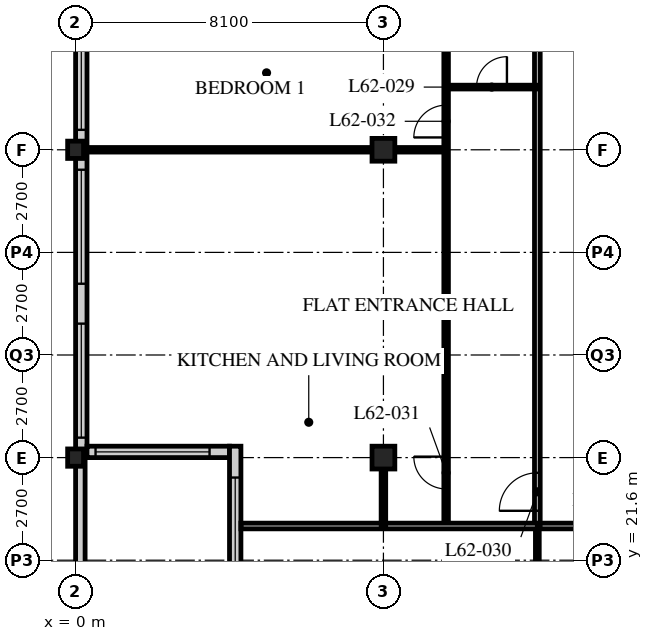
"""IFC4 building model, lengths in metres.
Left out: names, types, materials, properties, quantities, classifications, styles, units other than length and angle.
Written with IfcOpenShell. Run it as: python <this file> out.ifc"""

import sys

from ifc_helpers import new_model, si_unit, direction, frame, frame_2d, origin, origin_2d, place, context, subcontext, project, spatial, rectangle, hollow_rectangle, i_section, extrude, element, fill, save


model = new_model("IFC4")
c1 = context("Model", 3, precision=1e-05, world=origin(), true_north=direction((0.0, 1.0)))
c2 = subcontext(c1, "Body", "Model", "MODEL_VIEW")
j1 = project(units=[si_unit("LENGTHUNIT", "METRE"), si_unit("PLANEANGLEUNIT", "RADIAN")], contexts=[c1])
p1 = place(None, origin())
s1 = spatial("IfcSite", under=j1, at=p1, CompositionType="ELEMENT")
p2 = place(p1, origin())
s2 = spatial("IfcBuilding", under=s1, at=p2, CompositionType="ELEMENT")
p3 = place(p2, frame((0.0, 0.0, 242.4)))
s3 = spatial("IfcBuildingStorey", under=s2, at=p3, CompositionType="ELEMENT", Elevation=242.4)
for number, where, z_axis, x_axis in (
    (1, (0.0, 24.3, 0.0), (0.0, 0.0, 1.0), (1.0, 0.0, 0.0)),
    (2, (0.0, 32.4, 0.0), (0.0, 0.0, 1.0), (1.0, 0.0, 0.0)),
):
    element("IfcColumn", number, at=place(p3, frame(where, z_axis=z_axis, x_axis=x_axis)), inside=s3, PredefinedType="COLUMN", context=c2, shape_type="SweptSolid", body=[
        extrude(i_section(OverallWidth=0.418, OverallDepth=0.456, WebThickness=0.042, FlangeThickness=0.067, FilletRadius=0.015, at=origin_2d()), origin(), (0.0, 0.0, 1.0), 3.9),
    ])
for number, where, z_axis, x_axis in (
    (3, (8.1, 24.3, 0.0), (0.0, 0.0, 1.0), (1.0, 0.0, 0.0)),
    (4, (8.1, 32.4, 0.0), (0.0, 0.0, 1.0), (1.0, 0.0, 0.0)),
):
    element("IfcColumn", number, at=place(p3, frame(where, z_axis=z_axis, x_axis=x_axis)), inside=s3, PredefinedType="COLUMN", context=c2, shape_type="SweptSolid", body=[
        extrude(hollow_rectangle(XDim=0.6, YDim=0.6, WallThickness=0.05, at=origin_2d()), origin(), (0.0, 0.0, 1.0), 3.9),
    ])
p4 = place(p3, frame((0.15, 56.4, 0.0), z_axis=(0.0, 0.0, 1.0), x_axis=(0.0, -1.0, 0.0)))
e5 = element("IfcWall", 5, at=p4, inside=s3, PredefinedType="SOLIDWALL", context=c2, shape_type="SweptSolid", body=[
    extrude(rectangle(XDim=32.1, YDim=0.3, at=frame_2d((16.05, 0.0))), origin(), (0.0, 0.0, 1.0), 3.69),
])
p5 = place(p4, frame((0.225, 0.0, 0.6)))
e6 = element("IfcOpeningElement", 6, at=p5, cuts=e5, PredefinedType="OPENING", context=c2, shape_type="SweptSolid", body=[
    extrude(rectangle(XDim=3.0, YDim=2.3, at=frame_2d((1.5, 1.15))), frame((0.0, 0.16, 0.0), z_axis=(0.0, -1.0, 0.0), x_axis=(1.0, 0.0, 0.0)), (0.0, 0.0, 1.0), 0.32),
])
p6 = place(p4, frame((4.275, 0.0, 0.6)))
e7 = element("IfcOpeningElement", 7, at=p6, cuts=e5, PredefinedType="OPENING", context=c2, shape_type="SweptSolid", body=[
    extrude(rectangle(XDim=3.0, YDim=2.3, at=frame_2d((1.5, 1.15))), frame((0.0, 0.16, 0.0), z_axis=(0.0, -1.0, 0.0), x_axis=(1.0, 0.0, 0.0)), (0.0, 0.0, 1.0), 0.32),
])
p7 = place(p4, frame((8.325, 0.0, 0.6)))
e8 = element("IfcOpeningElement", 8, at=p7, cuts=e5, PredefinedType="OPENING", context=c2, shape_type="SweptSolid", body=[
    extrude(rectangle(XDim=3.0, YDim=2.3, at=frame_2d((1.5, 1.15))), frame((0.0, 0.16, 0.0), z_axis=(0.0, -1.0, 0.0), x_axis=(1.0, 0.0, 0.0)), (0.0, 0.0, 1.0), 0.32),
])
p8 = place(p4, frame((12.375, 0.0, 0.6)))
e9 = element("IfcOpeningElement", 9, at=p8, cuts=e5, PredefinedType="OPENING", context=c2, shape_type="SweptSolid", body=[
    extrude(rectangle(XDim=3.0, YDim=2.3, at=frame_2d((1.5, 1.15))), frame((0.0, 0.16, 0.0), z_axis=(0.0, -1.0, 0.0), x_axis=(1.0, 0.0, 0.0)), (0.0, 0.0, 1.0), 0.32),
])
p9 = place(p4, frame((16.425, 0.0, 0.6)))
e10 = element("IfcOpeningElement", 10, at=p9, cuts=e5, PredefinedType="OPENING", context=c2, shape_type="SweptSolid", body=[
    extrude(rectangle(XDim=3.0, YDim=2.3, at=frame_2d((1.5, 1.15))), frame((0.0, 0.16, 0.0), z_axis=(0.0, -1.0, 0.0), x_axis=(1.0, 0.0, 0.0)), (0.0, 0.0, 1.0), 0.32),
])
p10 = place(p4, frame((20.475, 0.0, 0.6)))
e11 = element("IfcOpeningElement", 11, at=p10, cuts=e5, PredefinedType="OPENING", context=c2, shape_type="SweptSolid", body=[
    extrude(rectangle(XDim=3.0, YDim=2.3, at=frame_2d((1.5, 1.15))), frame((0.0, 0.16, 0.0), z_axis=(0.0, -1.0, 0.0), x_axis=(1.0, 0.0, 0.0)), (0.0, 0.0, 1.0), 0.32),
])
p11 = place(p4, frame((24.525, 0.0, 0.6)))
e12 = element("IfcOpeningElement", 12, at=p11, cuts=e5, PredefinedType="OPENING", context=c2, shape_type="SweptSolid", body=[
    extrude(rectangle(XDim=3.0, YDim=2.3, at=frame_2d((1.5, 1.15))), frame((0.0, 0.16, 0.0), z_axis=(0.0, -1.0, 0.0), x_axis=(1.0, 0.0, 0.0)), (0.0, 0.0, 1.0), 0.32),
])
p12 = place(p4, frame((28.575, 0.0, 0.6)))
e13 = element("IfcOpeningElement", 13, at=p12, cuts=e5, PredefinedType="OPENING", context=c2, shape_type="SweptSolid", body=[
    extrude(rectangle(XDim=3.0, YDim=2.3, at=frame_2d((1.5, 1.15))), frame((0.0, 0.16, 0.0), z_axis=(0.0, -1.0, 0.0), x_axis=(1.0, 0.0, 0.0)), (0.0, 0.0, 1.0), 0.32),
])
p13 = place(p3, frame((0.3, 24.45, 0.0), z_axis=(0.0, 0.0, 1.0), x_axis=(1.0, 0.0, 0.0)))
e14 = element("IfcWall", 14, at=p13, inside=s3, PredefinedType="SOLIDWALL", context=c2, shape_type="SweptSolid", body=[
    extrude(rectangle(XDim=3.75, YDim=0.3, at=frame_2d((1.875, 0.0))), origin(), (0.0, 0.0, 1.0), 3.69),
])
p14 = place(p13, frame((0.225, 0.0, 0.6)))
e15 = element("IfcOpeningElement", 15, at=p14, cuts=e14, PredefinedType="OPENING", context=c2, shape_type="SweptSolid", body=[
    extrude(rectangle(XDim=3.0, YDim=2.3, at=frame_2d((1.5, 1.15))), frame((0.0, 0.16, 0.0), z_axis=(0.0, -1.0, 0.0), x_axis=(1.0, 0.0, 0.0)), (0.0, 0.0, 1.0), 0.32),
])
p15 = place(p3, frame((4.2, 24.6, 0.0), z_axis=(0.0, 0.0, 1.0), x_axis=(0.0, -1.0, 0.0)))
e16 = element("IfcWall", 16, at=p15, inside=s3, PredefinedType="SOLIDWALL", context=c2, shape_type="SweptSolid", body=[
    extrude(rectangle(XDim=4.35, YDim=0.3, at=frame_2d((2.175, 0.0))), origin(), (0.0, 0.0, 1.0), 3.69),
])
p16 = place(p15, frame((0.825, 0.0, 0.6)))
e17 = element("IfcOpeningElement", 17, at=p16, cuts=e16, PredefinedType="OPENING", context=c2, shape_type="SweptSolid", body=[
    extrude(rectangle(XDim=3.0, YDim=2.3, at=frame_2d((1.5, 1.15))), frame((0.0, 0.16, 0.0), z_axis=(0.0, -1.0, 0.0), x_axis=(1.0, 0.0, 0.0)), (0.0, 0.0, 1.0), 0.32),
])
p17 = place(p3, frame((0.125, 24.3, 0.0), z_axis=(0.0, 0.0, 1.0), x_axis=(0.0, -1.0, 0.0)))
e18 = element("IfcWall", 18, at=p17, inside=s3, PredefinedType="PARAPET", context=c2, shape_type="SweptSolid", body=[
    extrude(rectangle(XDim=5.4, YDim=0.25, at=frame_2d((2.7, 0.0))), origin(), (0.0, 0.0, 1.0), 1.38),
])
p18 = place(p3, frame((12.15, 22.5, 0.0), z_axis=(0.0, 0.0, 1.0), x_axis=(1.0, 0.0, 0.0)))
e19 = element("IfcWall", 19, at=p18, inside=s3, PredefinedType="PARTITIONING", context=c2, shape_type="SweptSolid", body=[
    extrude(rectangle(XDim=32.4, YDim=0.15, at=frame_2d((16.2, 0.0))), origin(), (0.0, 0.0, 1.0), 3.69),
])
p19 = place(p18, frame((6.4, 0.0, 0.0)))
e20 = element("IfcOpeningElement", 20, at=p19, cuts=e19, PredefinedType="OPENING", context=c2, shape_type="SweptSolid", body=[
    extrude(rectangle(XDim=1.0, YDim=2.1, at=frame_2d((0.5, 1.05))), frame((0.0, 0.085, 0.0), z_axis=(0.0, -1.0, 0.0), x_axis=(1.0, 0.0, 0.0)), (0.0, 0.0, 1.0), 0.17),
])
p20 = place(p18, frame((10.45, 0.0, 0.0)))
e21 = element("IfcOpeningElement", 21, at=p20, cuts=e19, PredefinedType="OPENING", context=c2, shape_type="SweptSolid", body=[
    extrude(rectangle(XDim=1.0, YDim=2.1, at=frame_2d((0.5, 1.05))), frame((0.0, 0.085, 0.0), z_axis=(0.0, -1.0, 0.0), x_axis=(1.0, 0.0, 0.0)), (0.0, 0.0, 1.0), 0.17),
])
p21 = place(p18, frame((14.5, 0.0, 0.0)))
e22 = element("IfcOpeningElement", 22, at=p21, cuts=e19, PredefinedType="OPENING", context=c2, shape_type="SweptSolid", body=[
    extrude(rectangle(XDim=1.0, YDim=2.1, at=frame_2d((0.5, 1.05))), frame((0.0, 0.085, 0.0), z_axis=(0.0, -1.0, 0.0), x_axis=(1.0, 0.0, 0.0)), (0.0, 0.0, 1.0), 0.17),
])
p22 = place(p18, frame((17.725, 0.0, 0.0)))
e23 = element("IfcOpeningElement", 23, at=p22, cuts=e19, PredefinedType="OPENING", context=c2, shape_type="SweptSolid", body=[
    extrude(rectangle(XDim=1.0, YDim=2.1, at=frame_2d((0.5, 1.05))), frame((0.0, 0.085, 0.0), z_axis=(0.0, -1.0, 0.0), x_axis=(1.0, 0.0, 0.0)), (0.0, 0.0, 1.0), 0.17),
])
p23 = place(p18, frame((22.6, 0.0, 0.0)))
e24 = element("IfcOpeningElement", 24, at=p23, cuts=e19, PredefinedType="OPENING", context=c2, shape_type="SweptSolid", body=[
    extrude(rectangle(XDim=1.0, YDim=2.1, at=frame_2d((0.5, 1.05))), frame((0.0, 0.085, 0.0), z_axis=(0.0, -1.0, 0.0), x_axis=(1.0, 0.0, 0.0)), (0.0, 0.0, 1.0), 0.17),
])
p24 = place(p18, frame((26.65, 0.0, 0.0)))
e25 = element("IfcOpeningElement", 25, at=p24, cuts=e19, PredefinedType="OPENING", context=c2, shape_type="SweptSolid", body=[
    extrude(rectangle(XDim=1.0, YDim=2.1, at=frame_2d((0.5, 1.05))), frame((0.0, 0.085, 0.0), z_axis=(0.0, -1.0, 0.0), x_axis=(1.0, 0.0, 0.0)), (0.0, 0.0, 1.0), 0.17),
])
p25 = place(p18, frame((2.625, 0.0, 0.0)))
e26 = element("IfcOpeningElement", 26, at=p25, cuts=e19, PredefinedType="OPENING", context=c2, shape_type="SweptSolid", body=[
    extrude(rectangle(XDim=1.0, YDim=2.1, at=frame_2d((0.5, 1.05))), frame((0.0, 0.085, 0.0), z_axis=(0.0, -1.0, 0.0), x_axis=(1.0, 0.0, 0.0)), (0.0, 0.0, 1.0), 0.17),
])
p26 = place(p18, frame((28.775, 0.0, 0.0)))
e27 = element("IfcOpeningElement", 27, at=p26, cuts=e19, PredefinedType="OPENING", context=c2, shape_type="SweptSolid", body=[
    extrude(rectangle(XDim=1.0, YDim=2.1, at=frame_2d((0.5, 1.05))), frame((0.0, 0.085, 0.0), z_axis=(0.0, -1.0, 0.0), x_axis=(1.0, 0.0, 0.0)), (0.0, 0.0, 1.0), 0.17),
])
p27 = place(p3, frame((12.15, 22.5, 0.0), z_axis=(0.0, 0.0, 1.0), x_axis=(0.0, 1.0, 0.0)))
e28 = element("IfcWall", 28, at=p27, inside=s3, PredefinedType="PARTITIONING", context=c2, shape_type="SweptSolid", body=[
    extrude(rectangle(XDim=26.1, YDim=0.15, at=frame_2d((13.05, 0.0))), origin(), (0.0, 0.0, 1.0), 3.69),
])
p28 = place(p27, frame((0.4, 0.0, 0.0)))
e29 = element("IfcOpeningElement", 29, at=p28, cuts=e28, PredefinedType="OPENING", context=c2, shape_type="SweptSolid", body=[
    extrude(rectangle(XDim=1.0, YDim=2.1, at=frame_2d((0.5, 1.05))), frame((0.0, 0.085, 0.0), z_axis=(0.0, -1.0, 0.0), x_axis=(1.0, 0.0, 0.0)), (0.0, 0.0, 1.0), 0.17),
])
p29 = place(p27, frame((14.35, 0.0, 0.0)))
e30 = element("IfcOpeningElement", 30, at=p29, cuts=e28, PredefinedType="OPENING", context=c2, shape_type="SweptSolid", body=[
    extrude(rectangle(XDim=1.0, YDim=2.1, at=frame_2d((0.5, 1.05))), frame((0.0, 0.085, 0.0), z_axis=(0.0, -1.0, 0.0), x_axis=(1.0, 0.0, 0.0)), (0.0, 0.0, 1.0), 0.17),
])
p30 = place(p3, frame((9.75, 22.5, 0.0), z_axis=(0.0, 0.0, 1.0), x_axis=(0.0, 1.0, 0.0)))
e31 = element("IfcWall", 31, at=p30, inside=s3, PredefinedType="PARTITIONING", context=c2, shape_type="SweptSolid", body=[
    extrude(rectangle(XDim=26.1, YDim=0.12, at=frame_2d((13.05, 0.0))), origin(), (0.0, 0.0, 1.0), 3.69),
])
p31 = place(p30, frame((0.975, 0.0, 0.0)))
e32 = element("IfcOpeningElement", 32, at=p31, cuts=e31, PredefinedType="OPENING", context=c2, shape_type="SweptSolid", body=[
    extrude(rectangle(XDim=0.85, YDim=2.1, at=frame_2d((0.425, 1.05))), frame((0.0, 0.07, 0.0), z_axis=(0.0, -1.0, 0.0), x_axis=(1.0, 0.0, 0.0)), (0.0, 0.0, 1.0), 0.14),
])
p32 = place(p30, frame((10.225, 0.0, 0.0)))
e33 = element("IfcOpeningElement", 33, at=p32, cuts=e31, PredefinedType="OPENING", context=c2, shape_type="SweptSolid", body=[
    extrude(rectangle(XDim=0.85, YDim=2.1, at=frame_2d((0.425, 1.05))), frame((0.0, 0.07, 0.0), z_axis=(0.0, -1.0, 0.0), x_axis=(1.0, 0.0, 0.0)), (0.0, 0.0, 1.0), 0.14),
])
p33 = place(p30, frame((14.925, 0.0, 0.0)))
e34 = element("IfcOpeningElement", 34, at=p33, cuts=e31, PredefinedType="OPENING", context=c2, shape_type="SweptSolid", body=[
    extrude(rectangle(XDim=0.85, YDim=2.1, at=frame_2d((0.425, 1.05))), frame((0.0, 0.07, 0.0), z_axis=(0.0, -1.0, 0.0), x_axis=(1.0, 0.0, 0.0)), (0.0, 0.0, 1.0), 0.14),
])
p34 = place(p30, frame((22.375, 0.0, 0.0)))
e35 = element("IfcOpeningElement", 35, at=p34, cuts=e31, PredefinedType="OPENING", context=c2, shape_type="SweptSolid", body=[
    extrude(rectangle(XDim=0.85, YDim=2.1, at=frame_2d((0.425, 1.05))), frame((0.0, 0.07, 0.0), z_axis=(0.0, -1.0, 0.0), x_axis=(1.0, 0.0, 0.0)), (0.0, 0.0, 1.0), 0.14),
])
p35 = place(p3, frame((12.15, 34.05, 0.0), z_axis=(0.0, 0.0, 1.0), x_axis=(-1.0, 0.0, 0.0)))
e36 = element("IfcWall", 36, at=p35, inside=s3, PredefinedType="PARTITIONING", context=c2, shape_type="SweptSolid", body=[
    extrude(rectangle(XDim=2.4, YDim=0.1, at=frame_2d((1.2, 0.0))), origin(), (0.0, 0.0, 1.0), 3.69),
])
p36 = place(p35, frame((0.8, 0.0, 0.0)))
e37 = element("IfcOpeningElement", 37, at=p36, cuts=e36, PredefinedType="OPENING", context=c2, shape_type="SweptSolid", body=[
    extrude(rectangle(XDim=0.8, YDim=2.1, at=frame_2d((0.4, 1.05))), frame((0.0, 0.06, 0.0), z_axis=(0.0, -1.0, 0.0), x_axis=(1.0, 0.0, 0.0)), (0.0, 0.0, 1.0), 0.12),
])
p37 = place(p3, frame((9.75, 32.4, 0.0), z_axis=(0.0, 0.0, 1.0), x_axis=(-1.0, 0.0, 0.0)))
e38 = element("IfcWall", 38, at=p37, inside=s3, PredefinedType="PARTITIONING", context=c2, shape_type="SweptSolid", body=[
    extrude(rectangle(XDim=9.45, YDim=0.12, at=frame_2d((4.725, 0.0))), origin(), (0.0, 0.0, 1.0), 2.928),
])
p38 = place(p3, frame((12.15, 22.5, 0.0), z_axis=(0.0, 0.0, 1.0), x_axis=(0.0, -1.0, 0.0)))
e39 = element("IfcWall", 39, at=p38, inside=s3, PredefinedType="PARTITIONING", context=c2, shape_type="SweptSolid", body=[
    extrude(rectangle(XDim=2.4, YDim=0.1, at=frame_2d((1.2, 0.0))), origin(), (0.0, 0.0, 1.0), 3.69),
])
p39 = place(p3, frame((4.35, 22.5, 0.0), z_axis=(0.0, 0.0, 1.0), x_axis=(1.0, 0.0, 0.0)))
e40 = element("IfcWall", 40, at=p39, inside=s3, PredefinedType="PARTITIONING", context=c2, shape_type="SweptSolid", body=[
    extrude(rectangle(XDim=7.8, YDim=0.15, at=frame_2d((3.9, 0.0))), origin(), (0.0, 0.0, 1.0), 3.69),
])
p40 = place(p3, frame((8.1, 22.5, 0.0), z_axis=(0.0, 0.0, 1.0), x_axis=(0.0, 1.0, 0.0)))
e41 = element("IfcWall", 41, at=p40, inside=s3, PredefinedType="PARTITIONING", context=c2, shape_type="SweptSolid", body=[
    extrude(rectangle(XDim=1.5, YDim=0.12, at=frame_2d((0.75, 0.0))), origin(), (0.0, 0.0, 1.0), 2.928),
])
p41 = place(p10, origin())
e42 = element("IfcWindow", 42, at=p41, inside=s3, PartitioningType="SINGLE_PANEL", PredefinedType="WINDOW", context=c2, shape_type="SweptSolid", body=[
    extrude(rectangle(XDim=3.0, YDim=2.3, at=frame_2d((1.5, 1.15))), frame((0.0, 0.03, 0.0), z_axis=(0.0, -1.0, 0.0), x_axis=(1.0, 0.0, 0.0)), (0.0, 0.0, 1.0), 0.06),
])
fill(e11, e42)
p42 = place(p11, origin())
e43 = element("IfcWindow", 43, at=p42, inside=s3, PartitioningType="SINGLE_PANEL", PredefinedType="WINDOW", context=c2, shape_type="SweptSolid", body=[
    extrude(rectangle(XDim=3.0, YDim=2.3, at=frame_2d((1.5, 1.15))), frame((0.0, 0.03, 0.0), z_axis=(0.0, -1.0, 0.0), x_axis=(1.0, 0.0, 0.0)), (0.0, 0.0, 1.0), 0.06),
])
fill(e12, e43)
p43 = place(p12, origin())
e44 = element("IfcWindow", 44, at=p43, inside=s3, PartitioningType="SINGLE_PANEL", PredefinedType="WINDOW", context=c2, shape_type="SweptSolid", body=[
    extrude(rectangle(XDim=3.0, YDim=2.3, at=frame_2d((1.5, 1.15))), frame((0.0, 0.03, 0.0), z_axis=(0.0, -1.0, 0.0), x_axis=(1.0, 0.0, 0.0)), (0.0, 0.0, 1.0), 0.06),
])
fill(e13, e44)
p44 = place(p14, origin())
e45 = element("IfcWindow", 45, at=p44, inside=s3, PartitioningType="SINGLE_PANEL", PredefinedType="WINDOW", context=c2, shape_type="SweptSolid", body=[
    extrude(rectangle(XDim=3.0, YDim=2.3, at=frame_2d((1.5, 1.15))), frame((0.0, 0.03, 0.0), z_axis=(0.0, -1.0, 0.0), x_axis=(1.0, 0.0, 0.0)), (0.0, 0.0, 1.0), 0.06),
])
fill(e15, e45)
p45 = place(p16, origin())
e46 = element("IfcWindow", 46, at=p45, inside=s3, PartitioningType="SINGLE_PANEL", PredefinedType="WINDOW", context=c2, shape_type="SweptSolid", body=[
    extrude(rectangle(XDim=3.0, YDim=2.3, at=frame_2d((1.5, 1.15))), frame((0.0, 0.03, 0.0), z_axis=(0.0, -1.0, 0.0), x_axis=(1.0, 0.0, 0.0)), (0.0, 0.0, 1.0), 0.06),
])
fill(e17, e46)
p46 = place(p36, origin())
e47 = element("IfcDoor", 47, at=p46, inside=s3, OperationType="SINGLE_SWING_RIGHT", PredefinedType="DOOR", context=c2, shape_type="SweptSolid", body=[
    extrude(rectangle(XDim=0.8, YDim=2.1, at=frame_2d((0.4, 1.05))), frame((0.0, 0.025, 0.0), z_axis=(0.0, -1.0, 0.0), x_axis=(1.0, 0.0, 0.0)), (0.0, 0.0, 1.0), 0.05),
])
fill(e37, e47)
p47 = place(p28, origin())
e48 = element("IfcDoor", 48, at=p47, inside=s3, OperationType="SINGLE_SWING_LEFT", PredefinedType="DOOR", context=c2, shape_type="SweptSolid", body=[
    extrude(rectangle(XDim=1.0, YDim=2.1, at=frame_2d((0.5, 1.05))), frame((0.0, 0.025, 0.0), z_axis=(0.0, -1.0, 0.0), x_axis=(1.0, 0.0, 0.0)), (0.0, 0.0, 1.0), 0.05),
])
fill(e29, e48)
p48 = place(p31, origin())
e49 = element("IfcDoor", 49, at=p48, inside=s3, OperationType="SINGLE_SWING_RIGHT", PredefinedType="DOOR", context=c2, shape_type="SweptSolid", body=[
    extrude(rectangle(XDim=0.85, YDim=2.1, at=frame_2d((0.425, 1.05))), frame((0.0, 0.025, 0.0), z_axis=(0.0, -1.0, 0.0), x_axis=(1.0, 0.0, 0.0)), (0.0, 0.0, 1.0), 0.05),
])
fill(e32, e49)
p49 = place(p32, origin())
e50 = element("IfcDoor", 50, at=p49, inside=s3, OperationType="SINGLE_SWING_LEFT", PredefinedType="DOOR", context=c2, shape_type="SweptSolid", body=[
    extrude(rectangle(XDim=0.85, YDim=2.1, at=frame_2d((0.425, 1.05))), frame((0.0, 0.025, 0.0), z_axis=(0.0, -1.0, 0.0), x_axis=(1.0, 0.0, 0.0)), (0.0, 0.0, 1.0), 0.05),
])
fill(e33, e50)
save(model, sys.argv[1])
